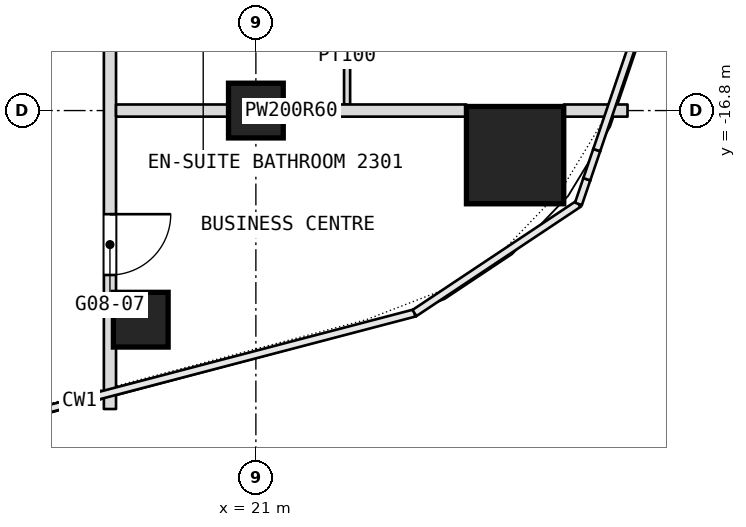
"""IFC4 building model, lengths in metres.
Left out: names, types, materials, properties, quantities, classifications, styles, units other than length and angle.
Written with IfcOpenShell. Run it as: python <this file> out.ifc"""

import sys

from ifc_helpers import new_model, si_unit, direction, frame, frame_2d, origin, origin_2d, place, context, subcontext, project, spatial, rectangle, extrude, element, fill, save


model = new_model("IFC4")
c1 = context("Model", 3, precision=1e-05, world=origin(), true_north=direction((0.0, 1.0)))
c2 = subcontext(c1, "Body", "Model", "MODEL_VIEW")
j1 = project(units=[si_unit("LENGTHUNIT", "METRE"), si_unit("PLANEANGLEUNIT", "RADIAN")], contexts=[c1])
p1 = place(None, origin())
s1 = spatial("IfcSite", under=j1, at=p1, CompositionType="ELEMENT")
p2 = place(p1, origin())
s2 = spatial("IfcBuilding", under=s1, at=p2, CompositionType="ELEMENT")
p3 = place(p2, frame((0.0, 0.0, 108.5)))
s3 = spatial("IfcBuildingStorey", under=s2, at=p3, CompositionType="ELEMENT", Elevation=108.5)
p4 = place(p3, frame((25.263, -17.533, 0.0), z_axis=(0.0, 0.0, 1.0), x_axis=(1.0, 0.0, 0.0)))
e1 = element("IfcColumn", 1, at=p4, inside=s3, PredefinedType="COLUMN", context=c2, shape_type="SweptSolid", body=[
    extrude(rectangle(XDim=1.6, YDim=1.6, at=origin_2d()), origin(), (0.0, 0.0, 1.0), 3.6),
])
for number, where, z_axis, x_axis in (
    (2, (21.0, -16.8, 0.0), (0.0, 0.0, 1.0), (1.0, 0.0, 0.0)),
    (3, (19.107, -20.239, 0.0), (0.0, 0.0, 1.0), (1.0, 0.0, 0.0)),
):
    element("IfcColumn", number, at=place(p3, frame(where, z_axis=z_axis, x_axis=x_axis)), inside=s3, PredefinedType="COLUMN", context=c2, shape_type="SweptSolid", body=[
        extrude(rectangle(XDim=0.9, YDim=0.9, at=origin_2d()), origin(), (0.0, 0.0, 1.0), 3.6),
    ])
p5 = place(p3, frame((22.5, -16.7, 0.0), z_axis=(0.0, 0.0, 1.0), x_axis=(0.0, 1.0, 0.0)))
e4 = element("IfcWall", 4, at=p5, inside=s3, PredefinedType="PARTITIONING", context=c2, shape_type="SweptSolid", body=[
    extrude(rectangle(XDim=2.35, YDim=0.1, at=frame_2d((1.175, 0.0))), origin(), (0.0, 0.0, 1.0), 3.34),
])
p6 = place(p5, frame((1.3, 0.0, 0.0)))
e5 = element("IfcOpeningElement", 5, at=p6, cuts=e4, PredefinedType="OPENING", context=c2, shape_type="SweptSolid", body=[
    extrude(rectangle(XDim=0.9, YDim=2.1, at=frame_2d((0.45, 1.05))), frame((0.0, 0.05, 0.0), z_axis=(0.0, -1.0, 0.0), x_axis=(1.0, 0.0, 0.0)), (0.0, 0.0, 1.0), 0.1),
])
p7 = place(p3, frame((18.6, -21.708, 0.0), z_axis=(0.0, 0.0, 1.0), x_axis=(0.0, 1.0, 0.0)))
e6 = element("IfcWall", 6, at=p7, inside=s3, PredefinedType="PARTITIONING", context=c2, shape_type="SweptSolid", body=[
    extrude(rectangle(XDim=49.648, YDim=0.2, at=frame_2d((24.824, 0.0))), origin(), (0.0, 0.0, 1.0), 3.34),
])
p8 = place(p7, frame((2.204, 0.0, 0.0)))
e7 = element("IfcOpeningElement", 7, at=p8, cuts=e6, PredefinedType="OPENING", context=c2, shape_type="SweptSolid", body=[
    extrude(rectangle(XDim=1.0, YDim=2.1, at=frame_2d((0.5, 1.05))), frame((0.0, 0.1, 0.0), z_axis=(0.0, -1.0, 0.0), x_axis=(1.0, 0.0, 0.0)), (0.0, 0.0, 1.0), 0.2),
])
p9 = place(p7, frame((7.708, 0.0, 0.0)))
e8 = element("IfcOpeningElement", 8, at=p9, cuts=e6, PredefinedType="OPENING", context=c2, shape_type="SweptSolid", body=[
    extrude(rectangle(XDim=1.0, YDim=2.1, at=frame_2d((0.5, 1.05))), frame((0.0, 0.1, 0.0), z_axis=(0.0, -1.0, 0.0), x_axis=(1.0, 0.0, 0.0)), (0.0, 0.0, 1.0), 0.2),
])
p10 = place(p7, frame((9.508, 0.0, 0.0)))
e9 = element("IfcOpeningElement", 9, at=p10, cuts=e6, PredefinedType="OPENING", context=c2, shape_type="SweptSolid", body=[
    extrude(rectangle(XDim=1.0, YDim=2.1, at=frame_2d((0.5, 1.05))), frame((0.0, 0.1, 0.0), z_axis=(0.0, -1.0, 0.0), x_axis=(1.0, 0.0, 0.0)), (0.0, 0.0, 1.0), 0.2),
])
p11 = place(p7, frame((13.708, 0.0, 0.0)))
e10 = element("IfcOpeningElement", 10, at=p11, cuts=e6, PredefinedType="OPENING", context=c2, shape_type="SweptSolid", body=[
    extrude(rectangle(XDim=1.0, YDim=2.1, at=frame_2d((0.5, 1.05))), frame((0.0, 0.1, 0.0), z_axis=(0.0, -1.0, 0.0), x_axis=(1.0, 0.0, 0.0)), (0.0, 0.0, 1.0), 0.2),
])
p12 = place(p7, frame((20.308, 0.0, 0.0)))
e11 = element("IfcOpeningElement", 11, at=p12, cuts=e6, PredefinedType="OPENING", context=c2, shape_type="SweptSolid", body=[
    extrude(rectangle(XDim=1.0, YDim=2.1, at=frame_2d((0.5, 1.05))), frame((0.0, 0.1, 0.0), z_axis=(0.0, -1.0, 0.0), x_axis=(1.0, 0.0, 0.0)), (0.0, 0.0, 1.0), 0.2),
])
p13 = place(p7, frame((25.008, 0.0, 0.0)))
e12 = element("IfcOpeningElement", 12, at=p13, cuts=e6, PredefinedType="OPENING", context=c2, shape_type="SweptSolid", body=[
    extrude(rectangle(XDim=1.8, YDim=2.1, at=frame_2d((0.9, 1.05))), frame((0.0, 0.1, 0.0), z_axis=(0.0, -1.0, 0.0), x_axis=(1.0, 0.0, 0.0)), (0.0, 0.0, 1.0), 0.2),
])
p14 = place(p7, frame((30.508, 0.0, 0.0)))
e13 = element("IfcOpeningElement", 13, at=p14, cuts=e6, PredefinedType="OPENING", context=c2, shape_type="SweptSolid", body=[
    extrude(rectangle(XDim=1.0, YDim=2.1, at=frame_2d((0.5, 1.05))), frame((0.0, 0.1, 0.0), z_axis=(0.0, -1.0, 0.0), x_axis=(1.0, 0.0, 0.0)), (0.0, 0.0, 1.0), 0.2),
])
p15 = place(p7, frame((37.108, 0.0, 0.0)))
e14 = element("IfcOpeningElement", 14, at=p15, cuts=e6, PredefinedType="OPENING", context=c2, shape_type="SweptSolid", body=[
    extrude(rectangle(XDim=1.0, YDim=2.1, at=frame_2d((0.5, 1.05))), frame((0.0, 0.1, 0.0), z_axis=(0.0, -1.0, 0.0), x_axis=(1.0, 0.0, 0.0)), (0.0, 0.0, 1.0), 0.2),
])
p16 = place(p7, frame((42.608, 0.0, 0.0)))
e15 = element("IfcOpeningElement", 15, at=p16, cuts=e6, PredefinedType="OPENING", context=c2, shape_type="SweptSolid", body=[
    extrude(rectangle(XDim=1.0, YDim=2.1, at=frame_2d((0.5, 1.05))), frame((0.0, 0.1, 0.0), z_axis=(0.0, -1.0, 0.0), x_axis=(1.0, 0.0, 0.0)), (0.0, 0.0, 1.0), 0.2),
])
p17 = place(p7, frame((44.608, 0.0, 0.0)))
e16 = element("IfcOpeningElement", 16, at=p17, cuts=e6, PredefinedType="OPENING", context=c2, shape_type="SweptSolid", body=[
    extrude(rectangle(XDim=1.0, YDim=2.1, at=frame_2d((0.5, 1.05))), frame((0.0, 0.1, 0.0), z_axis=(0.0, -1.0, 0.0), x_axis=(1.0, 0.0, 0.0)), (0.0, 0.0, 1.0), 0.2),
])
p18 = place(p3, frame((18.7, -16.8, 0.0), z_axis=(0.0, 0.0, 1.0), x_axis=(1.0, 0.0, 0.0)))
e17 = element("IfcWall", 17, at=p18, inside=s3, PredefinedType="PARTITIONING", context=c2, shape_type="SweptSolid", body=[
    extrude(rectangle(XDim=5.763, YDim=0.2, at=frame_2d((2.881, 0.0))), origin(), (0.0, 0.0, 1.0), 2.89),
])
p19 = place(p3, frame((26.063, -16.8, 0.0), z_axis=(0.0, 0.0, 1.0), x_axis=(1.0, 0.0, 0.0)))
e18 = element("IfcWall", 18, at=p19, inside=s3, PredefinedType="PARTITIONING", context=c2, shape_type="SweptSolid", body=[
    extrude(rectangle(XDim=1.049, YDim=0.2, at=frame_2d((0.524, 0.0))), origin(), (0.0, 0.0, 1.0), 3.34),
])
p20 = place(p8, origin())
e19 = element("IfcDoor", 19, at=p20, inside=s3, OperationType="SINGLE_SWING_LEFT", PredefinedType="DOOR", context=c2, shape_type="SweptSolid", body=[
    extrude(rectangle(XDim=1.0, YDim=2.1, at=frame_2d((0.5, 1.05))), frame((0.0, 0.025, 0.0), z_axis=(0.0, -1.0, 0.0), x_axis=(1.0, 0.0, 0.0)), (0.0, 0.0, 1.0), 0.05),
])
fill(e7, e19)
save(model, sys.argv[1])
